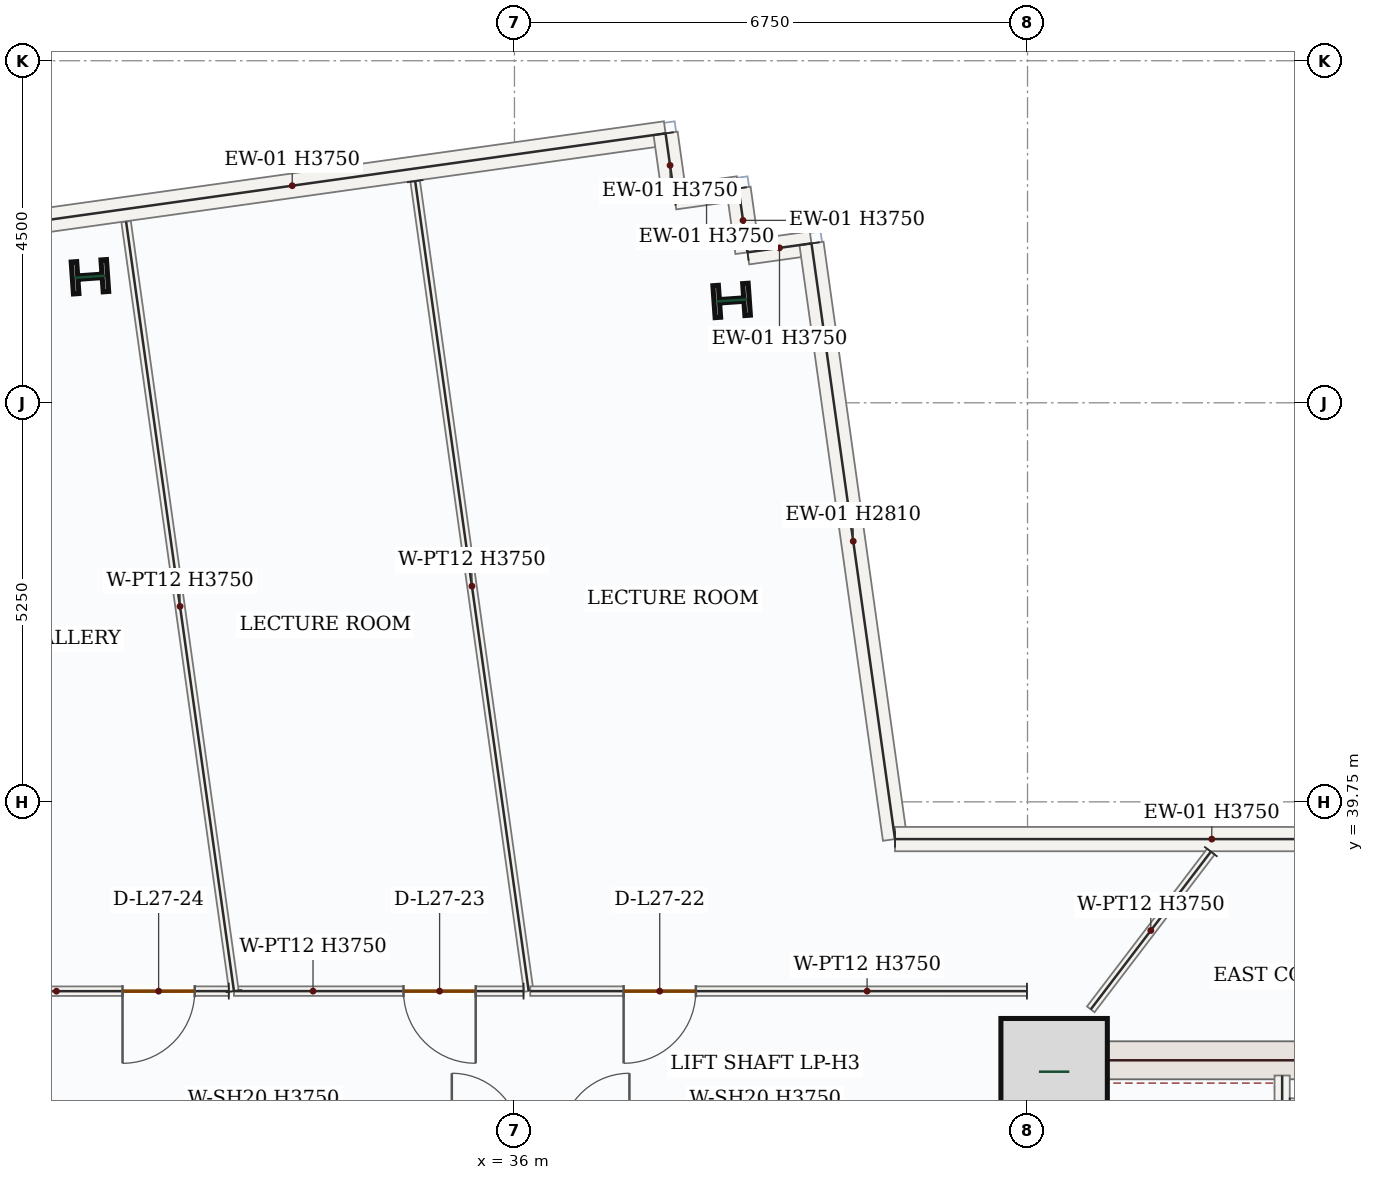
"""IFC4 building model, lengths in metres.
Left out: names, types, materials, properties, quantities, classifications, styles, units other than length and angle.
Written with IfcOpenShell. Run it as: python <this file> out.ifc"""

import sys

from ifc_helpers import new_model, si_unit, direction, frame, frame_2d, origin, origin_2d, place, context, subcontext, project, spatial, rectangle, i_section, extrude, source, transform, mapped, element, fill, save


model = new_model("IFC4")
c1 = context("Model", 3, precision=1e-05, world=origin(), true_north=direction((0.0, 1.0)))
c2 = subcontext(c1, "Body", "Model", "MODEL_VIEW")
j1 = project(units=[si_unit("LENGTHUNIT", "METRE"), si_unit("PLANEANGLEUNIT", "RADIAN")], contexts=[c1])
p1 = place(None, origin())
s1 = spatial("IfcSite", under=j1, at=p1, CompositionType="ELEMENT")
p2 = place(p1, origin())
s2 = spatial("IfcBuilding", under=s1, at=p2, CompositionType="ELEMENT")
p3 = place(p2, frame((0.0, 0.0, 121.5)))
s3 = spatial("IfcBuildingStorey", under=s2, at=p3, CompositionType="ELEMENT", Elevation=121.5)
p4 = place(p3, frame((43.0, 28.05, 0.0), z_axis=(0.0, 0.0, 1.0), x_axis=(0.0, 1.0, 0.0)))
e1 = element("IfcWall", 1, at=p4, inside=s3, PredefinedType="SHEAR", context=c2, shape_type="SweptSolid", body=[
    extrude(rectangle(XDim=8.55, YDim=0.5, at=frame_2d((4.275, 0.0))), origin(), (0.0, 0.0, 1.0), 3.75),
])
p5 = place(p4, frame((1.5, 0.0, 0.0)))
e2 = element("IfcOpeningElement", 2, at=p5, cuts=e1, PredefinedType="OPENING", context=c2, shape_type="SweptSolid", body=[
    extrude(rectangle(XDim=1.1, YDim=2.2, at=frame_2d((0.55, 1.1))), frame((0.0, 0.26, 0.0), z_axis=(0.0, -1.0, 0.0), x_axis=(1.0, 0.0, 0.0)), (0.0, 0.0, 1.0), 0.52),
])
m1 = source(origin(), c2, "Body", "SweptSolid", [
    extrude(rectangle(XDim=7.0, YDim=0.5, at=frame_2d((3.5, 0.0))), origin(), (0.0, 0.0, 1.0), 3.75),
])
p6 = place(p3, frame((43.25, 36.35, 0.0), z_axis=(0.0, 0.0, 1.0), x_axis=(1.0, 0.0, 0.0)))
e3 = element("IfcWall", 3, at=p6, inside=s3, PredefinedType="SHEAR", context=c2, shape_type="MappedRepresentation", body=[
    mapped(m1, transform((0.0, 0.0, 0.0), x_axis=(1.0, 0.0, 0.0), y_axis=(0.0, 1.0, 0.0), z_axis=(0.0, 0.0, 1.0), scale=1.0)),
])
m2 = source(origin(), c2, "Body", "SweptSolid", [
    extrude(rectangle(XDim=1.4, YDim=1.4, at=origin_2d()), origin(), (0.0, 0.0, 1.0), 4.2),
])
p7 = place(p3, frame((43.1, 36.2, 0.0), z_axis=(0.0, 0.0, 1.0), x_axis=(1.0, 0.0, 0.0)))
e4 = element("IfcColumn", 4, at=p7, inside=s3, PredefinedType="COLUMN", context=c2, shape_type="MappedRepresentation", body=[
    mapped(m2, transform((0.0, 0.0, 0.0), x_axis=(1.0, 0.0, 0.0), y_axis=(0.0, 1.0, 0.0), z_axis=(0.0, 0.0, 1.0), scale=1.0)),
])
m3 = source(origin(), c2, "Body", "SweptSolid", [
    extrude(i_section(OverallWidth=0.421, OverallDepth=0.465, WebThickness=0.045, FlangeThickness=0.073, FilletRadius=0.018, at=origin_2d()), origin(), (0.0, 0.0, 1.0), 4.2),
])
for number, where, z_axis, x_axis in (
    (5, (38.857, 46.346, 0.0), (0.0, 0.0, 1.0), (-0.07, 0.998, 0.0)),
    (6, (30.415, 46.658, 0.0), (0.0, 0.0, 1.0), (-0.07, 0.998, 0.0)),
):
    element("IfcColumn", number, at=place(p3, frame(where, z_axis=z_axis, x_axis=x_axis)), inside=s3, PredefinedType="COLUMN", context=c2, shape_type="MappedRepresentation", body=[
        mapped(m3, transform((0.0, 0.0, 0.0), x_axis=(1.0, 0.0, 0.0), y_axis=(0.0, 1.0, 0.0), z_axis=(0.0, 0.0, 1.0), scale=1.0)),
    ])
m4 = source(origin(), c2, "Body", "SweptSolid", [
    extrude(rectangle(XDim=9.92, YDim=0.32, at=frame_2d((4.96, 0.0))), origin(), (0.0, 0.0, 1.0), 3.75),
])
p8 = place(p3, frame((28.164, 47.167, 0.0), z_axis=(0.0, 0.0, 1.0), x_axis=(0.990316250135, 0.138829840876, 0.0)))
e7 = element("IfcWall", 7, at=p8, inside=s3, PredefinedType="SOLIDWALL", context=c2, shape_type="MappedRepresentation", body=[
    mapped(m4, transform((0.0, 0.0, 0.0), x_axis=(1.0, 0.0, 0.0), y_axis=(0.0, 1.0, 0.0), z_axis=(0.0, 0.0, 1.0), scale=1.0)),
])
m5 = source(origin(), c2, "Body", "SweptSolid", [
    extrude(rectangle(XDim=0.85, YDim=0.32, at=frame_2d((0.425, 0.0))), origin(), (0.0, 0.0, 1.0), 3.75),
])
for number, where, z_axis, x_axis in (
    (8, (37.988, 48.545, 0.0), (0.0, 0.0, 1.0), (0.139, -0.99, 0.0)),
    (9, (38.106, 47.703, 0.0), (0.0, 0.0, 1.0), (0.99, 0.139, 0.0)),
    (10, (38.948, 47.821, 0.0), (0.0, 0.0, 1.0), (0.139, -0.99, 0.0)),
    (11, (39.066, 46.979, 0.0), (0.0, 0.0, 1.0), (0.99, 0.139, 0.0)),
):
    element("IfcWall", number, at=place(p3, frame(where, z_axis=z_axis, x_axis=x_axis)), inside=s3, PredefinedType="SOLIDWALL", context=c2, shape_type="MappedRepresentation", body=[
        mapped(m5, transform((0.0, 0.0, 0.0), x_axis=(1.0, 0.0, 0.0), y_axis=(0.0, 1.0, 0.0), z_axis=(0.0, 0.0, 1.0), scale=1.0)),
    ])
m6 = source(origin(), c2, "Body", "SweptSolid", [
    extrude(rectangle(XDim=7.914, YDim=0.32, at=frame_2d((3.957, 0.0))), origin(), (0.0, 0.0, 1.0), 2.81),
])
p9 = place(p3, frame((39.908, 47.097, 0.0), z_axis=(0.0, 0.0, 1.0), x_axis=(0.138855403592, -0.990312666229, 0.0)))
e12 = element("IfcWall", 12, at=p9, inside=s3, PredefinedType="SOLIDWALL", context=c2, shape_type="MappedRepresentation", body=[
    mapped(m6, transform((0.0, 0.0, 0.0), x_axis=(1.0, 0.0, 0.0), y_axis=(0.0, 1.0, 0.0), z_axis=(0.0, 0.0, 1.0), scale=1.0)),
])
m7 = source(origin(), c2, "Body", "SweptSolid", [
    extrude(rectangle(XDim=8.335, YDim=0.32, at=frame_2d((4.168, 0.0))), origin(), (0.0, 0.0, 1.0), 3.75),
])
p10 = place(p3, frame((41.007, 39.26, 0.0), z_axis=(0.0, 0.0, 1.0), x_axis=(1.0, 0.0, 0.0)))
e13 = element("IfcWall", 13, at=p10, inside=s3, PredefinedType="SOLIDWALL", context=c2, shape_type="MappedRepresentation", body=[
    mapped(m7, transform((0.0, 0.0, 0.0), x_axis=(1.0, 0.0, 0.0), y_axis=(0.0, 1.0, 0.0), z_axis=(0.0, 0.0, 1.0), scale=1.0)),
])
p11 = place(p3, frame((46.1, 28.15, 0.0), z_axis=(0.0, 0.0, 1.0), x_axis=(0.0, 1.0, 0.0)))
e14 = element("IfcWall", 14, at=p11, inside=s3, PredefinedType="SOLIDWALL", context=c2, shape_type="SweptSolid", body=[
    extrude(rectangle(XDim=8.0, YDim=0.2, at=frame_2d((4.0, 0.0))), origin(), (0.0, 0.0, 1.0), 3.75),
])
p12 = place(p11, frame((0.4, 0.0, 0.0)))
e15 = element("IfcOpeningElement", 15, at=p12, cuts=e14, PredefinedType="OPENING", context=c2, shape_type="SweptSolid", body=[
    extrude(rectangle(XDim=1.05, YDim=2.15, at=frame_2d((0.525, 1.075))), frame((0.0, 0.11, 0.0), z_axis=(0.0, -1.0, 0.0), x_axis=(1.0, 0.0, 0.0)), (0.0, 0.0, 1.0), 0.22),
])
m8 = source(origin(), c2, "Body", "SweptSolid", [
    extrude(rectangle(XDim=3.25, YDim=0.2, at=frame_2d((1.625, 0.0))), origin(), (0.0, 0.0, 1.0), 3.75),
])
p13 = place(p3, frame((46.2, 35.75, 0.0), z_axis=(0.0, 0.0, 1.0), x_axis=(1.0, 0.0, 0.0)))
e16 = element("IfcWall", 16, at=p13, inside=s3, PredefinedType="SOLIDWALL", context=c2, shape_type="MappedRepresentation", body=[
    mapped(m8, transform((0.0, 0.0, 0.0), x_axis=(1.0, 0.0, 0.0), y_axis=(0.0, 1.0, 0.0), z_axis=(0.0, 0.0, 1.0), scale=1.0)),
])
m9 = source(origin(), c2, "Body", "SweptSolid", [
    extrude(rectangle(XDim=10.76, YDim=0.125, at=frame_2d((5.38, 0.0))), origin(), (0.0, 0.0, 1.0), 3.75),
])
p14 = place(p3, frame((34.694, 47.916, 0.0), z_axis=(0.0, 0.0, 1.0), x_axis=(0.138832093167, -0.99031593439, 0.0)))
e17 = element("IfcWall", 17, at=p14, inside=s3, PredefinedType="PARTITIONING", context=c2, shape_type="MappedRepresentation", body=[
    mapped(m9, transform((0.0, 0.0, 0.0), x_axis=(1.0, 0.0, 0.0), y_axis=(0.0, 1.0, 0.0), z_axis=(0.0, 0.0, 1.0), scale=1.0)),
])
p15 = place(p3, frame((36.119, 37.26, 0.0), z_axis=(0.0, 0.0, 1.0), x_axis=(-1.0, 0.0, 0.0)))
e18 = element("IfcWall", 18, at=p15, inside=s3, PredefinedType="PARTITIONING", context=c2, shape_type="SweptSolid", body=[
    extrude(rectangle(XDim=3.809, YDim=0.125, at=frame_2d((1.905, 0.0))), origin(), (0.0, 0.0, 1.0), 3.75),
])
p16 = place(p15, frame((0.629, 0.0, 0.0)))
e19 = element("IfcOpeningElement", 19, at=p16, cuts=e18, PredefinedType="OPENING", context=c2, shape_type="SweptSolid", body=[
    extrude(rectangle(XDim=0.95, YDim=2.15, at=frame_2d((0.475, 1.075))), frame((0.0, 0.073, 0.0), z_axis=(0.0, -1.0, 0.0), x_axis=(1.0, 0.0, 0.0)), (0.0, 0.0, 1.0), 0.145),
])
m10 = source(origin(), c2, "Body", "SweptSolid", [
    extrude(rectangle(XDim=10.222, YDim=0.125, at=frame_2d((5.111, 0.0))), origin(), (0.0, 0.0, 1.0), 3.75),
])
p17 = place(p3, frame((32.31, 37.26, 0.0), z_axis=(0.0, 0.0, 1.0), x_axis=(-0.138816035819, 0.990318185332, 0.0)))
e20 = element("IfcWall", 20, at=p17, inside=s3, PredefinedType="PARTITIONING", context=c2, shape_type="MappedRepresentation", body=[
    mapped(m10, transform((0.0, 0.0, 0.0), x_axis=(1.0, 0.0, 0.0), y_axis=(0.0, 1.0, 0.0), z_axis=(0.0, 0.0, 1.0), scale=1.0)),
])
p18 = place(p3, frame((32.242, 37.26, 0.0), z_axis=(0.0, 0.0, 1.0), x_axis=(-0.999999916483, -0.00040869704, 0.0)))
e21 = element("IfcWall", 21, at=p18, inside=s3, PredefinedType="PARTITIONING", context=c2, shape_type="SweptSolid", body=[
    extrude(rectangle(XDim=2.987, YDim=0.125, at=frame_2d((1.493, 0.0))), origin(), (0.0, 0.0, 1.0), 3.75),
])
p19 = place(p18, frame((0.448, 0.0, 0.0)))
e22 = element("IfcOpeningElement", 22, at=p19, cuts=e21, PredefinedType="OPENING", context=c2, shape_type="SweptSolid", body=[
    extrude(rectangle(XDim=0.95, YDim=2.15, at=frame_2d((0.475, 1.075))), frame((0.0, 0.073, 0.0), z_axis=(0.0, -1.0, 0.0), x_axis=(1.0, 0.0, 0.0)), (0.0, 0.0, 1.0), 0.145),
])
p20 = place(p3, frame((42.742, 37.26, 0.0), z_axis=(0.0, 0.0, 1.0), x_axis=(-0.999999999302, 3.7359435e-05, 0.0)))
e23 = element("IfcWall", 23, at=p20, inside=s3, PredefinedType="PARTITIONING", context=c2, shape_type="SweptSolid", body=[
    extrude(rectangle(XDim=6.535, YDim=0.125, at=frame_2d((3.268, 0.0))), origin(), (0.0, 0.0, 1.0), 3.75),
])
p21 = place(p20, frame((4.356, 0.0, 0.0)))
e24 = element("IfcOpeningElement", 24, at=p21, cuts=e23, PredefinedType="OPENING", context=c2, shape_type="SweptSolid", body=[
    extrude(rectangle(XDim=0.95, YDim=2.15, at=frame_2d((0.475, 1.075))), frame((0.0, 0.073, 0.0), z_axis=(0.0, -1.0, 0.0), x_axis=(1.0, 0.0, 0.0)), (0.0, 0.0, 1.0), 0.145),
])
m11 = source(origin(), c2, "Body", "SweptSolid", [
    extrude(rectangle(XDim=2.608, YDim=0.125, at=frame_2d((1.304, 0.0))), origin(), (0.0, 0.0, 1.0), 3.75),
])
p22 = place(p3, frame((45.162, 39.095, 0.0), z_axis=(0.0, 0.0, 1.0), x_axis=(-0.605840128894, -0.795586411537, 0.0)))
e25 = element("IfcWall", 25, at=p22, inside=s3, PredefinedType="PARTITIONING", context=c2, shape_type="MappedRepresentation", body=[
    mapped(m11, transform((0.0, 0.0, 0.0), x_axis=(1.0, 0.0, 0.0), y_axis=(0.0, 1.0, 0.0), z_axis=(0.0, 0.0, 1.0), scale=1.0)),
])
m12 = source(origin(), c2, "Body", "SweptSolid", [
    extrude(rectangle(XDim=0.95, YDim=2.15, at=frame_2d((0.475, 1.075))), frame((0.0, 0.025, 0.0), z_axis=(0.0, -1.0, 0.0), x_axis=(1.0, 0.0, 0.0)), (0.0, 0.0, 1.0), 0.05),
])
p23 = place(p21, origin())
e26 = element("IfcDoor", 26, at=p23, inside=s3, OperationType="SINGLE_SWING_RIGHT", PredefinedType="DOOR", context=c2, shape_type="MappedRepresentation", body=[
    mapped(m12, transform((0.0, 0.0, 0.0), x_axis=(1.0, 0.0, 0.0), y_axis=(0.0, 1.0, 0.0), z_axis=(0.0, 0.0, 1.0), scale=1.0)),
])
fill(e24, e26)
p24 = place(p16, origin())
e27 = element("IfcDoor", 27, at=p24, inside=s3, OperationType="SINGLE_SWING_LEFT", PredefinedType="DOOR", context=c2, shape_type="MappedRepresentation", body=[
    mapped(m12, transform((0.0, 0.0, 0.0), x_axis=(1.0, 0.0, 0.0), y_axis=(0.0, 1.0, 0.0), z_axis=(0.0, 0.0, 1.0), scale=1.0)),
])
fill(e19, e27)
p25 = place(p19, origin())
e28 = element("IfcDoor", 28, at=p25, inside=s3, OperationType="SINGLE_SWING_RIGHT", PredefinedType="DOOR", context=c2, shape_type="MappedRepresentation", body=[
    mapped(m12, transform((0.0, 0.0, 0.0), x_axis=(1.0, 0.0, 0.0), y_axis=(0.0, 1.0, 0.0), z_axis=(0.0, 0.0, 1.0), scale=1.0)),
])
fill(e22, e28)
save(model, sys.argv[1])
